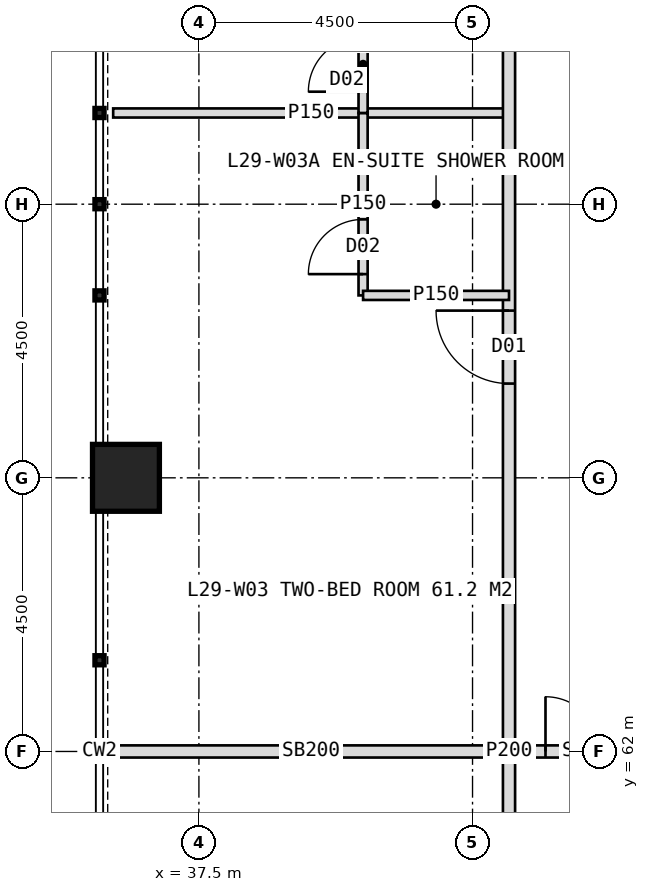
"""IFC4 building model, lengths in metres.
Left out: names, types, materials, properties, quantities, classifications, styles, units other than length and angle.
Written with IfcOpenShell. Run it as: python <this file> out.ifc"""

import sys

from ifc_helpers import new_model, si_unit, direction, frame, frame_2d, origin, origin_2d, place, context, subcontext, project, spatial, rectangle, hollow_rectangle, extrude, element, fill, save


model = new_model("IFC4")
c1 = context("Model", 3, precision=1e-05, world=origin(), true_north=direction((0.0, 1.0)))
c2 = subcontext(c1, "Body", "Model", "MODEL_VIEW")
j1 = project(units=[si_unit("LENGTHUNIT", "METRE"), si_unit("PLANEANGLEUNIT", "RADIAN")], contexts=[c1])
p1 = place(None, origin())
s1 = spatial("IfcSite", under=j1, at=p1, CompositionType="ELEMENT")
p2 = place(p1, origin())
s2 = spatial("IfcBuilding", under=s1, at=p2, CompositionType="ELEMENT")
p3 = place(p2, frame((0.0, 0.0, 124.0)))
s3 = spatial("IfcBuildingStorey", under=s2, at=p3, CompositionType="ELEMENT", Elevation=124.0)
p4 = place(p3, frame((36.3, 66.5, 0.0), z_axis=(0.0, 0.0, 1.0), x_axis=(1.0, 0.0, 0.0)))
e1 = element("IfcColumn", 1, at=p4, inside=s3, PredefinedType="COLUMN", context=c2, shape_type="SweptSolid", body=[
    extrude(hollow_rectangle(XDim=1.1, YDim=1.1, WallThickness=0.1, at=origin_2d()), origin(), (0.0, 0.0, 1.0), 4.0),
])
p5 = place(p3, frame((42.6, 62.0, 0.0), z_axis=(0.0, 0.0, 1.0), x_axis=(-1.0, 0.0, 0.0)))
e2 = element("IfcWall", 2, at=p5, inside=s3, PredefinedType="SOLIDWALL", context=c2, shape_type="SweptSolid", body=[
    extrude(rectangle(XDim=6.51, YDim=0.2, at=frame_2d((3.255, 0.0))), origin(), (0.0, 0.0, 1.0), 2.95),
])
p6 = place(p3, frame((42.6, 72.5, 0.0), z_axis=(0.0, 0.0, 1.0), x_axis=(-1.0, 0.0, 0.0)))
e3 = element("IfcWall", 3, at=p6, inside=s3, PredefinedType="PARTITIONING", context=c2, shape_type="SweptSolid", body=[
    extrude(rectangle(XDim=6.51, YDim=0.15, at=frame_2d((3.255, 0.0))), origin(), (0.0, 0.0, 1.0), 3.75),
])
p7 = place(p3, frame((42.6, 44.6, 0.0), z_axis=(0.0, 0.0, 1.0), x_axis=(0.0, 1.0, 0.0)))
e4 = element("IfcWall", 4, at=p7, inside=s3, PredefinedType="PARTITIONING", context=c2, shape_type="SweptSolid", body=[
    extrude(rectangle(XDim=34.8, YDim=0.2, at=frame_2d((17.4, 0.0))), origin(), (0.0, 0.0, 1.0), 3.75),
])
p8 = place(p7, frame((2.45, 0.0, 0.0)))
e5 = element("IfcOpeningElement", 5, at=p8, cuts=e4, PredefinedType="OPENING", context=c2, shape_type="SweptSolid", body=[
    extrude(rectangle(XDim=1.2, YDim=2.2, at=frame_2d((0.6, 1.1))), frame((0.0, 0.11, 0.0), z_axis=(0.0, -1.0, 0.0), x_axis=(1.0, 0.0, 0.0)), (0.0, 0.0, 1.0), 0.22),
])
p9 = place(p7, frame((10.15, 0.0, 0.0)))
e6 = element("IfcOpeningElement", 6, at=p9, cuts=e4, PredefinedType="OPENING", context=c2, shape_type="SweptSolid", body=[
    extrude(rectangle(XDim=1.2, YDim=2.2, at=frame_2d((0.6, 1.1))), frame((0.0, 0.11, 0.0), z_axis=(0.0, -1.0, 0.0), x_axis=(1.0, 0.0, 0.0)), (0.0, 0.0, 1.0), 0.22),
])
p10 = place(p7, frame((23.45, 0.0, 0.0)))
e7 = element("IfcOpeningElement", 7, at=p10, cuts=e4, PredefinedType="OPENING", context=c2, shape_type="SweptSolid", body=[
    extrude(rectangle(XDim=1.2, YDim=2.2, at=frame_2d((0.6, 1.1))), frame((0.0, 0.11, 0.0), z_axis=(0.0, -1.0, 0.0), x_axis=(1.0, 0.0, 0.0)), (0.0, 0.0, 1.0), 0.22),
])
p11 = place(p7, frame((30.55, 0.0, 0.0)))
e8 = element("IfcOpeningElement", 8, at=p11, cuts=e4, PredefinedType="OPENING", context=c2, shape_type="SweptSolid", body=[
    extrude(rectangle(XDim=1.2, YDim=2.2, at=frame_2d((0.6, 1.1))), frame((0.0, 0.11, 0.0), z_axis=(0.0, -1.0, 0.0), x_axis=(1.0, 0.0, 0.0)), (0.0, 0.0, 1.0), 0.22),
])
p12 = place(p3, frame((40.2, 69.5, 0.0), z_axis=(0.0, 0.0, 1.0), x_axis=(0.0, 1.0, 0.0)))
e9 = element("IfcWall", 9, at=p12, inside=s3, PredefinedType="PARTITIONING", context=c2, shape_type="SweptSolid", body=[
    extrude(rectangle(XDim=3.0, YDim=0.15, at=frame_2d((1.5, 0.0))), origin(), (0.0, 0.0, 1.0), 3.75),
])
p13 = place(p12, frame((0.35, 0.0, 0.0)))
e10 = element("IfcOpeningElement", 10, at=p13, cuts=e9, PredefinedType="OPENING", context=c2, shape_type="SweptSolid", body=[
    extrude(rectangle(XDim=0.9, YDim=2.1, at=frame_2d((0.45, 1.05))), frame((0.0, 0.085, 0.0), z_axis=(0.0, -1.0, 0.0), x_axis=(1.0, 0.0, 0.0)), (0.0, 0.0, 1.0), 0.17),
])
p14 = place(p3, frame((42.6, 69.5, 0.0), z_axis=(0.0, 0.0, 1.0), x_axis=(-1.0, 0.0, 0.0)))
e11 = element("IfcWall", 11, at=p14, inside=s3, PredefinedType="PARTITIONING", context=c2, shape_type="SweptSolid", body=[
    extrude(rectangle(XDim=2.4, YDim=0.15, at=frame_2d((1.2, 0.0))), origin(), (0.0, 0.0, 1.0), 3.75),
])
p15 = place(p3, frame((40.2, 72.5, 0.0), z_axis=(0.0, 0.0, 1.0), x_axis=(0.0, 1.0, 0.0)))
e12 = element("IfcWall", 12, at=p15, inside=s3, PredefinedType="PARTITIONING", context=c2, shape_type="SweptSolid", body=[
    extrude(rectangle(XDim=2.4, YDim=0.15, at=frame_2d((1.2, 0.0))), origin(), (0.0, 0.0, 1.0), 3.75),
])
p16 = place(p15, frame((0.35, 0.0, 0.0)))
e13 = element("IfcOpeningElement", 13, at=p16, cuts=e12, PredefinedType="OPENING", context=c2, shape_type="SweptSolid", body=[
    extrude(rectangle(XDim=0.9, YDim=2.1, at=frame_2d((0.45, 1.05))), frame((0.0, 0.085, 0.0), z_axis=(0.0, -1.0, 0.0), x_axis=(1.0, 0.0, 0.0)), (0.0, 0.0, 1.0), 0.17),
])
p17 = place(p3, frame((45.3, 62.0, 0.0), z_axis=(0.0, 0.0, 1.0), x_axis=(-1.0, 0.0, 0.0)))
e14 = element("IfcWall", 14, at=p17, inside=s3, PredefinedType="SOLIDWALL", context=c2, shape_type="SweptSolid", body=[
    extrude(rectangle(XDim=2.7, YDim=0.2, at=frame_2d((1.35, 0.0))), origin(), (0.0, 0.0, 1.0), 2.95),
])
p18 = place(p17, frame((0.3, 0.0, 0.0)))
e15 = element("IfcOpeningElement", 15, at=p18, cuts=e14, PredefinedType="OPENING", context=c2, shape_type="SweptSolid", body=[
    extrude(rectangle(XDim=1.8, YDim=2.2, at=frame_2d((0.9, 1.1))), frame((0.0, 0.11, 0.0), z_axis=(0.0, -1.0, 0.0), x_axis=(1.0, 0.0, 0.0)), (0.0, 0.0, 1.0), 0.22),
])
p19 = place(p10, origin())
e16 = element("IfcDoor", 16, at=p19, inside=s3, OperationType="SINGLE_SWING_RIGHT", PredefinedType="DOOR", context=c2, shape_type="SweptSolid", body=[
    extrude(rectangle(XDim=1.2, YDim=2.2, at=frame_2d((0.6, 1.1))), frame((0.0, 0.025, 0.0), z_axis=(0.0, -1.0, 0.0), x_axis=(1.0, 0.0, 0.0)), (0.0, 0.0, 1.0), 0.05),
])
fill(e7, e16)
p20 = place(p13, origin())
e17 = element("IfcDoor", 17, at=p20, inside=s3, OperationType="SINGLE_SWING_LEFT", PredefinedType="DOOR", context=c2, shape_type="SweptSolid", body=[
    extrude(rectangle(XDim=0.9, YDim=2.1, at=frame_2d((0.45, 1.05))), frame((0.0, 0.025, 0.0), z_axis=(0.0, -1.0, 0.0), x_axis=(1.0, 0.0, 0.0)), (0.0, 0.0, 1.0), 0.05),
])
fill(e10, e17)
p21 = place(p16, origin())
e18 = element("IfcDoor", 18, at=p21, inside=s3, OperationType="SINGLE_SWING_LEFT", PredefinedType="DOOR", context=c2, shape_type="SweptSolid", body=[
    extrude(rectangle(XDim=0.9, YDim=2.1, at=frame_2d((0.45, 1.05))), frame((0.0, 0.025, 0.0), z_axis=(0.0, -1.0, 0.0), x_axis=(1.0, 0.0, 0.0)), (0.0, 0.0, 1.0), 0.05),
])
fill(e13, e18)
p22 = place(p18, origin())
e19 = element("IfcDoor", 19, at=p22, inside=s3, OperationType="DOUBLE_DOOR_DOUBLE_SWING", PredefinedType="DOOR", context=c2, shape_type="SweptSolid", body=[
    extrude(rectangle(XDim=1.8, YDim=2.2, at=frame_2d((0.9, 1.1))), frame((0.0, 0.025, 0.0), z_axis=(0.0, -1.0, 0.0), x_axis=(1.0, 0.0, 0.0)), (0.0, 0.0, 1.0), 0.05),
])
fill(e15, e19)
save(model, sys.argv[1])
